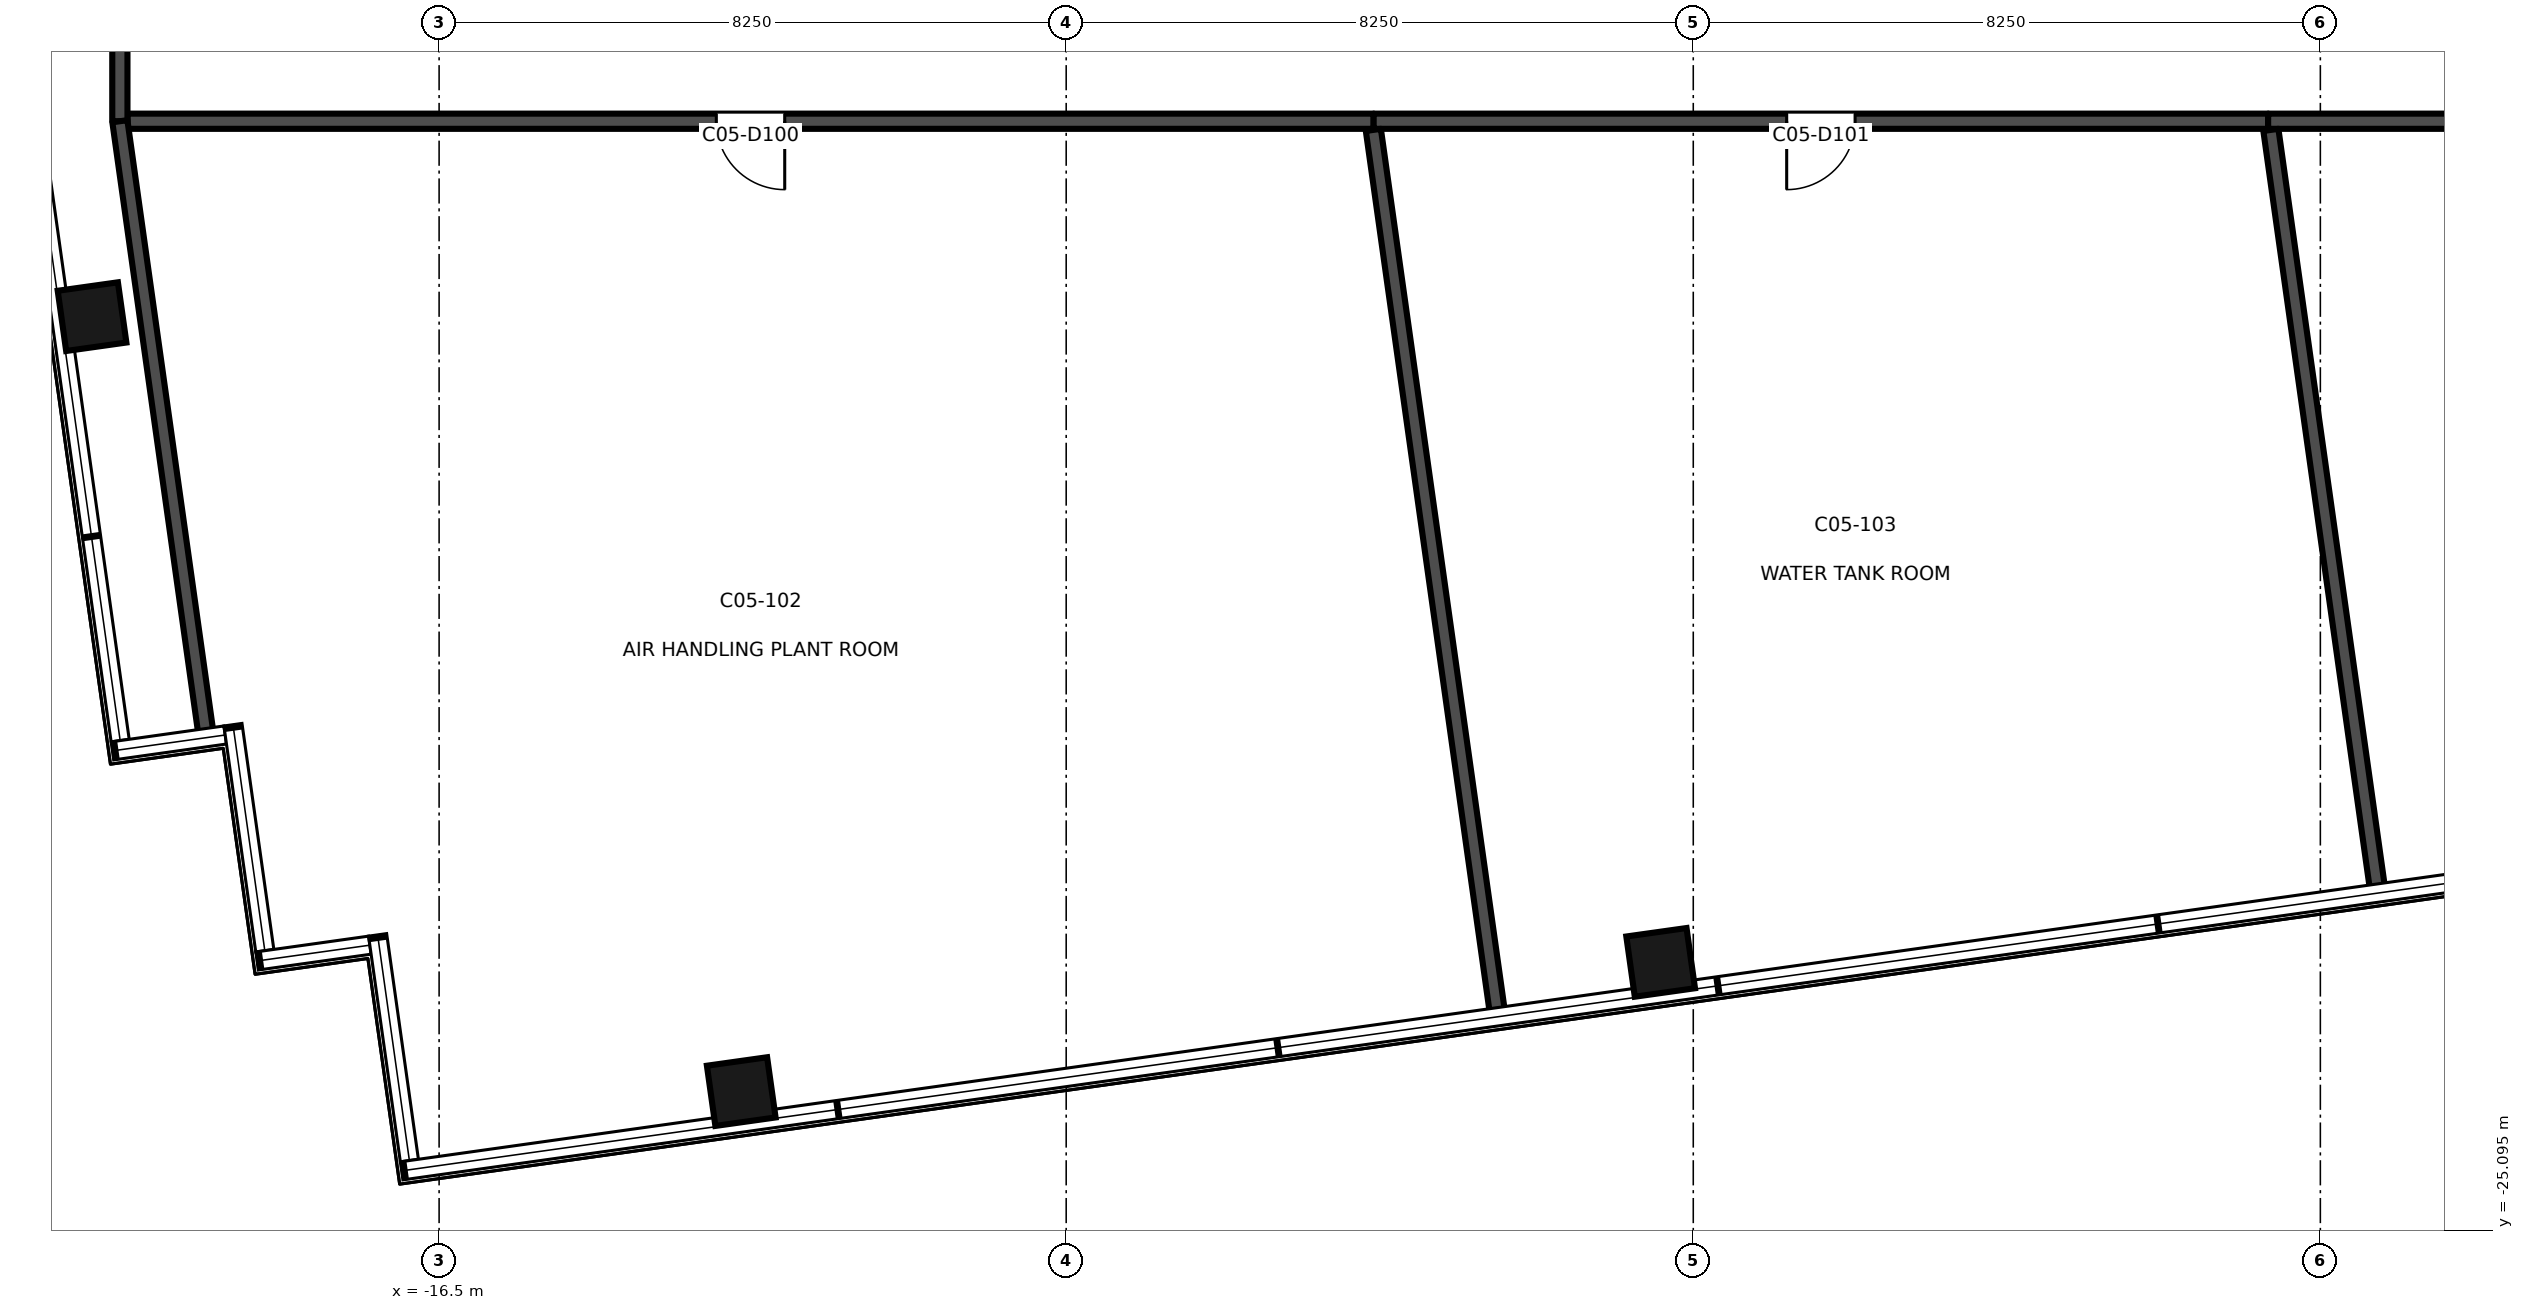
"""IFC4 building model, lengths in metres.
Left out: names, types, materials, properties, quantities, classifications, styles, units other than length and angle.
Written with IfcOpenShell. Run it as: python <this file> out.ifc"""

import sys

from ifc_helpers import new_model, si_unit, direction, frame, frame_2d, origin, origin_2d, place, context, subcontext, project, spatial, rectangle, extrude, element, fill, save


model = new_model("IFC4")
c1 = context("Model", 3, precision=1e-05, world=origin(), true_north=direction((0.0, 1.0)))
c2 = subcontext(c1, "Body", "Model", "MODEL_VIEW")
j1 = project(units=[si_unit("LENGTHUNIT", "METRE"), si_unit("PLANEANGLEUNIT", "RADIAN")], contexts=[c1])
p1 = place(None, origin())
s1 = spatial("IfcSite", under=j1, at=p1, CompositionType="ELEMENT")
p2 = place(p1, origin())
s2 = spatial("IfcBuilding", under=s1, at=p2, CompositionType="ELEMENT")
p3 = place(p2, frame((0.0, 0.0, 308.3)))
s3 = spatial("IfcBuildingStorey", under=s2, at=p3, CompositionType="ELEMENT", Elevation=308.3)
for number, where, z_axis, x_axis in (
    (1, (-12.525, -23.266, -0.2), (0.0, 0.0, 1.0), (0.99, 0.139, 0.0)),
    (2, (-0.429, -21.566, -0.2), (0.0, 0.0, 1.0), (0.99, 0.139, 0.0)),
    (3, (-21.066, -13.071, -0.2), (0.0, 0.0, 1.0), (-0.139, 0.99, 0.0)),
):
    element("IfcColumn", number, at=place(p3, frame(where, z_axis=z_axis, x_axis=x_axis)), inside=s3, PredefinedType="COLUMN", context=c2, shape_type="SweptSolid", body=[
        extrude(rectangle(XDim=0.8, YDim=0.8, at=origin_2d()), origin(), (0.0, 0.0, 1.0), 4.0),
    ])
p4 = place(p3, frame((-4.205, -10.5, 0.0), z_axis=(0.0, 0.0, 1.0), x_axis=(-1.0, 0.0, 0.0)))
e4 = element("IfcWall", 4, at=p4, inside=s3, PredefinedType="PARTITIONING", context=c2, shape_type="SweptSolid", body=[
    extrude(rectangle(XDim=16.395, YDim=0.2, at=frame_2d((8.198, 0.0))), origin(), (0.0, 0.0, 1.0), 3.1),
])
p5 = place(p4, frame((7.748, 0.0, 0.0)))
e5 = element("IfcOpeningElement", 5, at=p5, cuts=e4, PredefinedType="OPENING", context=c2, shape_type="SweptSolid", body=[
    extrude(rectangle(XDim=0.9, YDim=2.1, at=frame_2d((0.45, 1.05))), frame((0.0, 0.111, 0.0), z_axis=(0.0, -1.0, 0.0), x_axis=(1.0, 0.0, 0.0)), (0.0, 0.0, 1.0), 0.221),
])
p6 = place(p3, frame((7.563, -10.5, 0.0), z_axis=(0.0, 0.0, 1.0), x_axis=(-1.0, 0.0, 0.0)))
e6 = element("IfcWall", 6, at=p6, inside=s3, PredefinedType="PARTITIONING", context=c2, shape_type="SweptSolid", body=[
    extrude(rectangle(XDim=11.768, YDim=0.2, at=frame_2d((5.884, 0.0))), origin(), (0.0, 0.0, 1.0), 3.19),
])
p7 = place(p6, frame((5.434, 0.0, 0.0)))
e7 = element("IfcOpeningElement", 7, at=p7, cuts=e6, PredefinedType="OPENING", context=c2, shape_type="SweptSolid", body=[
    extrude(rectangle(XDim=0.9, YDim=2.1, at=frame_2d((0.45, 1.05))), frame((0.0, 0.111, 0.0), z_axis=(0.0, -1.0, 0.0), x_axis=(1.0, 0.0, 0.0)), (0.0, 0.0, 1.0), 0.221),
])
p8 = place(p3, frame((20.7, -10.5, 0.0), z_axis=(0.0, 0.0, 1.0), x_axis=(-1.0, 0.0, 0.0)))
e8 = element("IfcWall", 8, at=p8, inside=s3, PredefinedType="PARTITIONING", context=c2, shape_type="SweptSolid", body=[
    extrude(rectangle(XDim=13.137, YDim=0.2, at=frame_2d((6.568, 0.0))), origin(), (0.0, 0.0, 1.0), 3.19),
])
p9 = place(p8, frame((6.119, 0.0, 0.0)))
e9 = element("IfcOpeningElement", 9, at=p9, cuts=e8, PredefinedType="OPENING", context=c2, shape_type="SweptSolid", body=[
    extrude(rectangle(XDim=0.9, YDim=2.1, at=frame_2d((0.45, 1.05))), frame((0.0, 0.111, 0.0), z_axis=(0.0, -1.0, 0.0), x_axis=(1.0, 0.0, 0.0)), (0.0, 0.0, 1.0), 0.221),
])
p10 = place(p3, frame((-20.7, -10.5, 0.0), z_axis=(0.0, 0.0, 1.0), x_axis=(0.0, 1.0, 0.0)))
e10 = element("IfcWall", 10, at=p10, inside=s3, PredefinedType="PARTITIONING", context=c2, shape_type="SweptSolid", body=[
    extrude(rectangle(XDim=18.0, YDim=0.2, at=frame_2d((9.0, 0.0))), origin(), (0.0, 0.0, 1.0), 3.5),
])
p11 = place(p10, frame((8.55, 0.0, 0.0)))
e11 = element("IfcOpeningElement", 11, at=p11, cuts=e10, PredefinedType="OPENING", context=c2, shape_type="SweptSolid", body=[
    extrude(rectangle(XDim=0.9, YDim=2.1, at=frame_2d((0.45, 1.05))), frame((0.0, 0.111, 0.0), z_axis=(0.0, -1.0, 0.0), x_axis=(1.0, 0.0, 0.0)), (0.0, 0.0, 1.0), 0.221),
])
p12 = place(p3, frame((-4.209, -10.614, 0.0), z_axis=(0.0, 0.0, 1.0), x_axis=(0.139166837679, -0.990268948968, 0.0)))
e12 = element("IfcWall", 12, at=p12, inside=s3, PredefinedType="PARTITIONING", context=c2, shape_type="SweptSolid", body=[
    extrude(rectangle(XDim=11.691, YDim=0.2, at=frame_2d((5.845, 0.0))), origin(), (0.0, 0.0, 1.0), 3.8),
])
p13 = place(p3, frame((-19.573, -18.52, 0.0), z_axis=(0.0, 0.0, 1.0), x_axis=(-0.13915044451, 0.990271252634, 0.0)))
e13 = element("IfcWall", 13, at=p13, inside=s3, PredefinedType="PARTITIONING", context=c2, shape_type="SweptSolid", body=[
    extrude(rectangle(XDim=8.099, YDim=0.2, at=frame_2d((4.049, 0.0))), origin(), (0.0, 0.0, 1.0), 3.8),
])
p14 = place(p3, frame((7.599, -10.614, 0.0), z_axis=(0.0, 0.0, 1.0), x_axis=(0.139131599901, -0.990273900448, 0.0)))
e14 = element("IfcWall", 14, at=p14, inside=s3, PredefinedType="PARTITIONING", context=c2, shape_type="SweptSolid", body=[
    extrude(rectangle(XDim=10.048, YDim=0.2, at=frame_2d((5.024, 0.0))), origin(), (0.0, 0.0, 1.0), 3.19),
])
p15 = place(p5, origin())
e15 = element("IfcDoor", 15, at=p15, inside=s3, OperationType="SINGLE_SWING_LEFT", PredefinedType="DOOR", context=c2, shape_type="SweptSolid", body=[
    extrude(rectangle(XDim=0.9, YDim=2.1, at=frame_2d((0.45, 1.05))), frame((0.0, 0.025, 0.0), z_axis=(0.0, -1.0, 0.0), x_axis=(1.0, 0.0, 0.0)), (0.0, 0.0, 1.0), 0.05),
])
fill(e5, e15)
p16 = place(p7, origin())
e16 = element("IfcDoor", 16, at=p16, inside=s3, OperationType="SINGLE_SWING_RIGHT", PredefinedType="DOOR", context=c2, shape_type="SweptSolid", body=[
    extrude(rectangle(XDim=0.9, YDim=2.1, at=frame_2d((0.45, 1.05))), frame((0.0, 0.025, 0.0), z_axis=(0.0, -1.0, 0.0), x_axis=(1.0, 0.0, 0.0)), (0.0, 0.0, 1.0), 0.05),
])
fill(e7, e16)
save(model, sys.argv[1])
